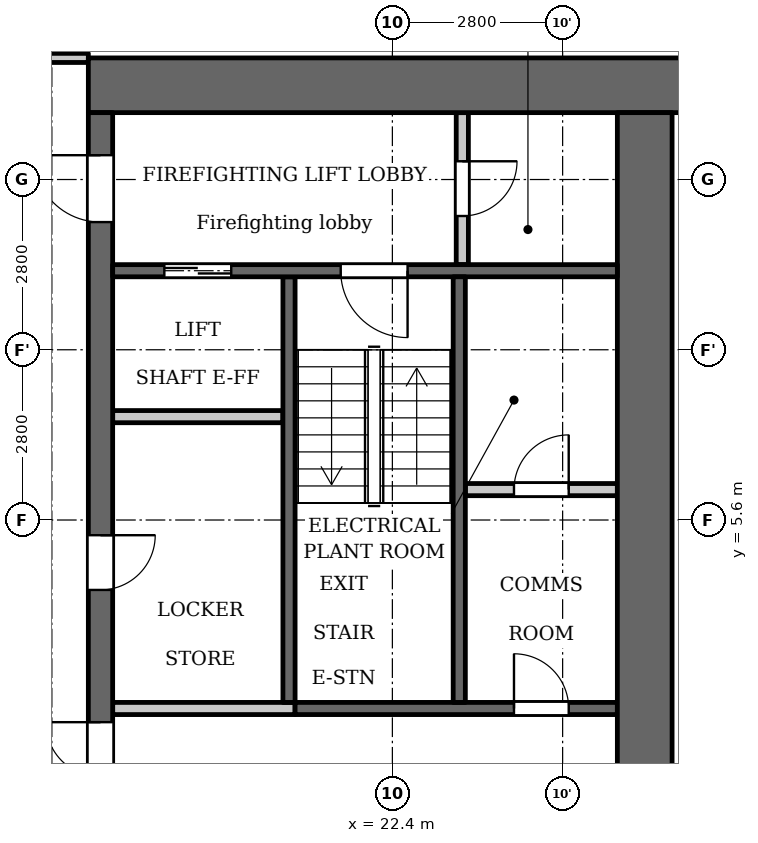
"""IFC4 building model, lengths in metres.
Left out: names, types, materials, properties, quantities, classifications, styles, units other than length and angle.
Written with IfcOpenShell. Run it as: python <this file> out.ifc"""

import sys

from ifc_helpers import new_model, si_unit, direction, frame, frame_2d, origin, place, context, subcontext, project, spatial, rectangle, extrude, element, fill, save


model = new_model("IFC4")
c1 = context("Model", 3, precision=1e-05, world=origin(), true_north=direction((0.0, 1.0)))
c2 = subcontext(c1, "Body", "Model", "MODEL_VIEW")
j1 = project(units=[si_unit("LENGTHUNIT", "METRE"), si_unit("PLANEANGLEUNIT", "RADIAN")], contexts=[c1])
p1 = place(None, origin())
s1 = spatial("IfcSite", under=j1, at=p1, CompositionType="ELEMENT")
p2 = place(p1, origin())
s2 = spatial("IfcBuilding", under=s1, at=p2, CompositionType="ELEMENT")
p3 = place(p2, frame((0.0, 0.0, 51.5)))
s3 = spatial("IfcBuildingStorey", under=s2, at=p3, CompositionType="ELEMENT", Elevation=51.5)
p4 = place(p3, frame((20.7, 2.6, 0.0), z_axis=(0.0, 0.0, 1.0), x_axis=(0.0, 1.0, 0.0)))
e1 = element("IfcWall", 1, at=p4, inside=s3, PredefinedType="SHEAR", context=c2, shape_type="SweptSolid", body=[
    extrude(rectangle(XDim=7.0, YDim=0.2, at=frame_2d((3.5, 0.0))), origin(), (0.0, 0.0, 1.0), 3.2),
])
p5 = place(p3, frame((20.8, 2.5, 0.0), z_axis=(0.0, 0.0, 1.0), x_axis=(1.0, 0.0, 0.0)))
e2 = element("IfcWall", 2, at=p5, inside=s3, PredefinedType="SHEAR", context=c2, shape_type="SweptSolid", body=[
    extrude(rectangle(XDim=5.3, YDim=0.2, at=frame_2d((2.65, 0.0))), origin(), (0.0, 0.0, 1.0), 3.2),
])
p6 = place(p5, frame((3.6, 0.0, 0.0)))
e3 = element("IfcOpeningElement", 3, at=p6, cuts=e2, PredefinedType="OPENING", context=c2, shape_type="SweptSolid", body=[
    extrude(rectangle(XDim=0.9, YDim=2.1, at=frame_2d((0.45, 1.05))), frame((0.0, 0.11, 0.0), z_axis=(0.0, -1.0, 0.0), x_axis=(1.0, 0.0, 0.0)), (0.0, 0.0, 1.0), 0.22),
])
p7 = place(p3, frame((17.4, 12.75, 0.0), z_axis=(0.0, 0.0, 1.0), x_axis=(1.0, 0.0, 0.0)))
e4 = element("IfcWall", 4, at=p7, inside=s3, PredefinedType="SHEAR", context=c2, shape_type="SweptSolid", body=[
    extrude(rectangle(XDim=10.4, YDim=0.9, at=frame_2d((5.2, 0.0))), origin(), (0.0, 0.0, 1.0), 3.2),
])
p8 = place(p3, frame((17.6, -12.3, 0.0), z_axis=(0.0, 0.0, 1.0), x_axis=(0.0, 1.0, 0.0)))
e5 = element("IfcWall", 5, at=p8, inside=s3, PredefinedType="SHEAR", context=c2, shape_type="SweptSolid", body=[
    extrude(rectangle(XDim=24.6, YDim=0.4, at=frame_2d((12.3, 0.0))), origin(), (0.0, 0.0, 1.0), 3.2),
])
p9 = place(p8, frame((6.0, 0.0, 0.0)))
e6 = element("IfcOpeningElement", 6, at=p9, cuts=e5, PredefinedType="OPENING", context=c2, shape_type="SweptSolid", body=[
    extrude(rectangle(XDim=1.1, YDim=2.1, at=frame_2d((0.55, 1.05))), frame((0.0, 0.21, 0.0), z_axis=(0.0, -1.0, 0.0), x_axis=(1.0, 0.0, 0.0)), (0.0, 0.0, 1.0), 0.42),
])
p10 = place(p8, frame((8.4, 0.0, 0.0)))
e7 = element("IfcOpeningElement", 7, at=p10, cuts=e5, PredefinedType="OPENING", context=c2, shape_type="SweptSolid", body=[
    extrude(rectangle(XDim=1.1, YDim=2.1, at=frame_2d((0.55, 1.05))), frame((0.0, 0.21, 0.0), z_axis=(0.0, -1.0, 0.0), x_axis=(1.0, 0.0, 0.0)), (0.0, 0.0, 1.0), 0.42),
])
p11 = place(p8, frame((10.8, 0.0, 0.0)))
e8 = element("IfcOpeningElement", 8, at=p11, cuts=e5, PredefinedType="OPENING", context=c2, shape_type="SweptSolid", body=[
    extrude(rectangle(XDim=1.1, YDim=2.1, at=frame_2d((0.55, 1.05))), frame((0.0, 0.21, 0.0), z_axis=(0.0, -1.0, 0.0), x_axis=(1.0, 0.0, 0.0)), (0.0, 0.0, 1.0), 0.42),
])
p12 = place(p8, frame((16.75, 0.0, 0.0)))
e9 = element("IfcOpeningElement", 9, at=p12, cuts=e5, PredefinedType="OPENING", context=c2, shape_type="SweptSolid", body=[
    extrude(rectangle(XDim=0.9, YDim=2.1, at=frame_2d((0.45, 1.05))), frame((0.0, 0.21, 0.0), z_axis=(0.0, -1.0, 0.0), x_axis=(1.0, 0.0, 0.0)), (0.0, 0.0, 1.0), 0.42),
])
p13 = place(p8, frame((22.8, 0.0, 0.0)))
e10 = element("IfcOpeningElement", 10, at=p13, cuts=e5, PredefinedType="OPENING", context=c2, shape_type="SweptSolid", body=[
    extrude(rectangle(XDim=1.1, YDim=2.1, at=frame_2d((0.55, 1.05))), frame((0.0, 0.21, 0.0), z_axis=(0.0, -1.0, 0.0), x_axis=(1.0, 0.0, 0.0)), (0.0, 0.0, 1.0), 0.42),
])
p14 = place(p8, frame((0.7, 0.0, 0.0)))
e11 = element("IfcOpeningElement", 11, at=p14, cuts=e5, PredefinedType="OPENING", context=c2, shape_type="SweptSolid", body=[
    extrude(rectangle(XDim=1.1, YDim=2.1, at=frame_2d((0.55, 1.05))), frame((0.0, 0.21, 0.0), z_axis=(0.0, -1.0, 0.0), x_axis=(1.0, 0.0, 0.0)), (0.0, 0.0, 1.0), 0.42),
])
p15 = place(p8, frame((12.775, 0.0, 0.0)))
e12 = element("IfcOpeningElement", 12, at=p15, cuts=e5, PredefinedType="OPENING", context=c2, shape_type="SweptSolid", body=[
    extrude(rectangle(XDim=1.8, YDim=2.1, at=frame_2d((0.9, 1.05))), frame((0.0, 0.21, 0.0), z_axis=(0.0, -1.0, 0.0), x_axis=(1.0, 0.0, 0.0)), (0.0, 0.0, 1.0), 0.42),
])
p16 = place(p3, frame((26.55, -12.3, 0.0), z_axis=(0.0, 0.0, 1.0), x_axis=(0.0, 1.0, 0.0)))
e13 = element("IfcWall", 13, at=p16, inside=s3, PredefinedType="SHEAR", context=c2, shape_type="SweptSolid", body=[
    extrude(rectangle(XDim=24.6, YDim=0.9, at=frame_2d((12.3, 0.0))), origin(), (0.0, 0.0, 1.0), 3.2),
])
p17 = place(p3, frame((23.55, 9.8, 0.0), z_axis=(0.0, 0.0, 1.0), x_axis=(0.0, 1.0, 0.0)))
e14 = element("IfcWall", 14, at=p17, inside=s3, PredefinedType="PARTITIONING", context=c2, shape_type="SweptSolid", body=[
    extrude(rectangle(XDim=2.5, YDim=0.2, at=frame_2d((1.25, 0.0))), origin(), (0.0, 0.0, 1.0), 3.2),
])
p18 = place(p17, frame((0.8, 0.0, 0.0)))
e15 = element("IfcOpeningElement", 15, at=p18, cuts=e14, PredefinedType="OPENING", context=c2, shape_type="SweptSolid", body=[
    extrude(rectangle(XDim=0.9, YDim=2.1, at=frame_2d((0.45, 1.05))), frame((0.0, 0.11, 0.0), z_axis=(0.0, -1.0, 0.0), x_axis=(1.0, 0.0, 0.0)), (0.0, 0.0, 1.0), 0.22),
])
p19 = place(p3, frame((23.6, 6.1, 0.0), z_axis=(0.0, 0.0, 1.0), x_axis=(1.0, 0.0, 0.0)))
e16 = element("IfcWall", 16, at=p19, inside=s3, PredefinedType="PARTITIONING", context=c2, shape_type="SweptSolid", body=[
    extrude(rectangle(XDim=2.5, YDim=0.2, at=frame_2d((1.25, 0.0))), origin(), (0.0, 0.0, 1.0), 3.2),
])
p20 = place(p19, frame((0.8, 0.0, 0.0)))
e17 = element("IfcOpeningElement", 17, at=p20, cuts=e16, PredefinedType="OPENING", context=c2, shape_type="SweptSolid", body=[
    extrude(rectangle(XDim=0.9, YDim=2.1, at=frame_2d((0.45, 1.05))), frame((0.0, 0.11, 0.0), z_axis=(0.0, -1.0, 0.0), x_axis=(1.0, 0.0, 0.0)), (0.0, 0.0, 1.0), 0.22),
])
p21 = place(p3, frame((17.8, 2.5, 0.0), z_axis=(0.0, 0.0, 1.0), x_axis=(1.0, 0.0, 0.0)))
e18 = element("IfcWall", 18, at=p21, inside=s3, PredefinedType="PARTITIONING", context=c2, shape_type="SweptSolid", body=[
    extrude(rectangle(XDim=3.0, YDim=0.2, at=frame_2d((1.5, 0.0))), origin(), (0.0, 0.0, 1.0), 3.2),
])
p22 = place(p3, frame((17.8, 7.3, 0.0), z_axis=(0.0, 0.0, 1.0), x_axis=(1.0, 0.0, 0.0)))
e19 = element("IfcWall", 19, at=p22, inside=s3, PredefinedType="PARTITIONING", context=c2, shape_type="SweptSolid", body=[
    extrude(rectangle(XDim=2.8, YDim=0.2, at=frame_2d((1.4, 0.0))), origin(), (0.0, 0.0, 1.0), 3.2),
])
p23 = place(p3, frame((17.8, 9.7, 0.0), z_axis=(0.0, 0.0, 1.0), x_axis=(1.0, 0.0, 0.0)))
e20 = element("IfcWall", 20, at=p23, inside=s3, PredefinedType="SHEAR", context=c2, shape_type="SweptSolid", body=[
    extrude(rectangle(XDim=8.3, YDim=0.2, at=frame_2d((4.15, 0.0))), origin(), (0.0, 0.0, 1.0), 3.2),
])
p24 = place(p23, frame((0.85, 0.0, 0.0)))
e21 = element("IfcOpeningElement", 21, at=p24, cuts=e20, PredefinedType="OPENING", context=c2, shape_type="SweptSolid", body=[
    extrude(rectangle(XDim=1.1, YDim=2.1, at=frame_2d((0.55, 1.05))), frame((0.0, 0.11, 0.0), z_axis=(0.0, -1.0, 0.0), x_axis=(1.0, 0.0, 0.0)), (0.0, 0.0, 1.0), 0.22),
])
p25 = place(p23, frame((3.75, 0.0, 0.0)))
e22 = element("IfcOpeningElement", 22, at=p25, cuts=e20, PredefinedType="OPENING", context=c2, shape_type="SweptSolid", body=[
    extrude(rectangle(XDim=1.1, YDim=2.1, at=frame_2d((0.55, 1.05))), frame((0.0, 0.11, 0.0), z_axis=(0.0, -1.0, 0.0), x_axis=(1.0, 0.0, 0.0)), (0.0, 0.0, 1.0), 0.22),
])
p26 = place(p3, frame((23.5, 2.6, 0.0), z_axis=(0.0, 0.0, 1.0), x_axis=(0.0, 1.0, 0.0)))
e23 = element("IfcWall", 23, at=p26, inside=s3, PredefinedType="SHEAR", context=c2, shape_type="SweptSolid", body=[
    extrude(rectangle(XDim=7.0, YDim=0.2, at=frame_2d((3.5, 0.0))), origin(), (0.0, 0.0, 1.0), 3.2),
])
p27 = place(p3, frame((-17.4, 13.2, 0.0), z_axis=(0.0, 0.0, 1.0), x_axis=(1.0, 0.0, 0.0)))
e24 = element("IfcWall", 24, at=p27, inside=s3, PredefinedType="PARTITIONING", context=c2, shape_type="SweptSolid", body=[
    extrude(rectangle(XDim=34.8, YDim=0.15, at=frame_2d((17.4, 0.0))), origin(), (0.0, 0.0, 1.0), 3.2),
])
p28 = place(p27, frame((0.75, 0.0, 0.0)))
e25 = element("IfcOpeningElement", 25, at=p28, cuts=e24, PredefinedType="OPENING", context=c2, shape_type="SweptSolid", body=[
    extrude(rectangle(XDim=1.0, YDim=2.1, at=frame_2d((0.5, 1.05))), frame((0.0, 0.085, 0.0), z_axis=(0.0, -1.0, 0.0), x_axis=(1.0, 0.0, 0.0)), (0.0, 0.0, 1.0), 0.17),
])
p29 = place(p27, frame((33.15, 0.0, 0.0)))
e26 = element("IfcOpeningElement", 26, at=p29, cuts=e24, PredefinedType="OPENING", context=c2, shape_type="SweptSolid", body=[
    extrude(rectangle(XDim=1.0, YDim=2.1, at=frame_2d((0.5, 1.05))), frame((0.0, 0.085, 0.0), z_axis=(0.0, -1.0, 0.0), x_axis=(1.0, 0.0, 0.0)), (0.0, 0.0, 1.0), 0.17),
])
p30 = place(p27, frame((6.85, 0.0, 0.0)))
e27 = element("IfcOpeningElement", 27, at=p30, cuts=e24, PredefinedType="OPENING", context=c2, shape_type="SweptSolid", body=[
    extrude(rectangle(XDim=1.0, YDim=2.1, at=frame_2d((0.5, 1.05))), frame((0.0, 0.085, 0.0), z_axis=(0.0, -1.0, 0.0), x_axis=(1.0, 0.0, 0.0)), (0.0, 0.0, 1.0), 0.17),
])
p31 = place(p27, frame((18.05, 0.0, 0.0)))
e28 = element("IfcOpeningElement", 28, at=p31, cuts=e24, PredefinedType="OPENING", context=c2, shape_type="SweptSolid", body=[
    extrude(rectangle(XDim=1.0, YDim=2.1, at=frame_2d((0.5, 1.05))), frame((0.0, 0.085, 0.0), z_axis=(0.0, -1.0, 0.0), x_axis=(1.0, 0.0, 0.0)), (0.0, 0.0, 1.0), 0.17),
])
p32 = place(p27, frame((29.25, 0.0, 0.0)))
e29 = element("IfcOpeningElement", 29, at=p32, cuts=e24, PredefinedType="OPENING", context=c2, shape_type="SweptSolid", body=[
    extrude(rectangle(XDim=1.0, YDim=2.1, at=frame_2d((0.5, 1.05))), frame((0.0, 0.085, 0.0), z_axis=(0.0, -1.0, 0.0), x_axis=(1.0, 0.0, 0.0)), (0.0, 0.0, 1.0), 0.17),
])
p33 = place(p12, origin())
e30 = element("IfcDoor", 30, at=p33, inside=s3, OperationType="SINGLE_SWING_RIGHT", PredefinedType="DOOR", context=c2, shape_type="SweptSolid", body=[
    extrude(rectangle(XDim=0.9, YDim=2.1, at=frame_2d((0.45, 1.05))), frame((0.0, 0.025, 0.0), z_axis=(0.0, -1.0, 0.0), x_axis=(1.0, 0.0, 0.0)), (0.0, 0.0, 1.0), 0.05),
])
fill(e9, e30)
p34 = place(p24, origin())
e31 = element("IfcDoor", 31, at=p34, inside=s3, OperationType="DOUBLE_DOOR_SLIDING", PredefinedType="DOOR", context=c2, shape_type="SweptSolid", body=[
    extrude(rectangle(XDim=1.1, YDim=2.1, at=frame_2d((0.55, 1.05))), frame((0.0, 0.025, 0.0), z_axis=(0.0, -1.0, 0.0), x_axis=(1.0, 0.0, 0.0)), (0.0, 0.0, 1.0), 0.05),
])
fill(e21, e31)
p35 = place(p13, origin())
e32 = element("IfcDoor", 32, at=p35, inside=s3, OperationType="SINGLE_SWING_LEFT", PredefinedType="DOOR", context=c2, shape_type="SweptSolid", body=[
    extrude(rectangle(XDim=1.1, YDim=2.1, at=frame_2d((0.55, 1.05))), frame((0.0, 0.025, 0.0), z_axis=(0.0, -1.0, 0.0), x_axis=(1.0, 0.0, 0.0)), (0.0, 0.0, 1.0), 0.05),
])
fill(e10, e32)
p36 = place(p18, origin())
e33 = element("IfcDoor", 33, at=p36, inside=s3, OperationType="SINGLE_SWING_RIGHT", PredefinedType="DOOR", context=c2, shape_type="SweptSolid", body=[
    extrude(rectangle(XDim=0.9, YDim=2.1, at=frame_2d((0.45, 1.05))), frame((0.0, 0.025, 0.0), z_axis=(0.0, -1.0, 0.0), x_axis=(1.0, 0.0, 0.0)), (0.0, 0.0, 1.0), 0.05),
])
fill(e15, e33)
p37 = place(p25, origin())
e34 = element("IfcDoor", 34, at=p37, inside=s3, OperationType="SINGLE_SWING_RIGHT", PredefinedType="DOOR", context=c2, shape_type="SweptSolid", body=[
    extrude(rectangle(XDim=1.1, YDim=2.1, at=frame_2d((0.55, 1.05))), frame((0.0, 0.025, 0.0), z_axis=(0.0, -1.0, 0.0), x_axis=(1.0, 0.0, 0.0)), (0.0, 0.0, 1.0), 0.05),
])
fill(e22, e34)
p38 = place(p15, origin())
e35 = element("IfcDoor", 35, at=p38, inside=s3, OperationType="DOUBLE_DOOR_SINGLE_SWING", PredefinedType="DOOR", context=c2, shape_type="SweptSolid", body=[
    extrude(rectangle(XDim=1.8, YDim=2.1, at=frame_2d((0.9, 1.05))), frame((0.0, 0.025, 0.0), z_axis=(0.0, -1.0, 0.0), x_axis=(1.0, 0.0, 0.0)), (0.0, 0.0, 1.0), 0.05),
])
fill(e12, e35)
p39 = place(p20, origin())
e36 = element("IfcDoor", 36, at=p39, inside=s3, OperationType="SINGLE_SWING_LEFT", PredefinedType="DOOR", context=c2, shape_type="SweptSolid", body=[
    extrude(rectangle(XDim=0.9, YDim=2.1, at=frame_2d((0.45, 1.05))), frame((0.0, 0.025, 0.0), z_axis=(0.0, -1.0, 0.0), x_axis=(1.0, 0.0, 0.0)), (0.0, 0.0, 1.0), 0.05),
])
fill(e17, e36)
p40 = place(p6, origin())
e37 = element("IfcDoor", 37, at=p40, inside=s3, OperationType="SINGLE_SWING_RIGHT", PredefinedType="DOOR", context=c2, shape_type="SweptSolid", body=[
    extrude(rectangle(XDim=0.9, YDim=2.1, at=frame_2d((0.45, 1.05))), frame((0.0, 0.025, 0.0), z_axis=(0.0, -1.0, 0.0), x_axis=(1.0, 0.0, 0.0)), (0.0, 0.0, 1.0), 0.05),
])
fill(e3, e37)
save(model, sys.argv[1])
